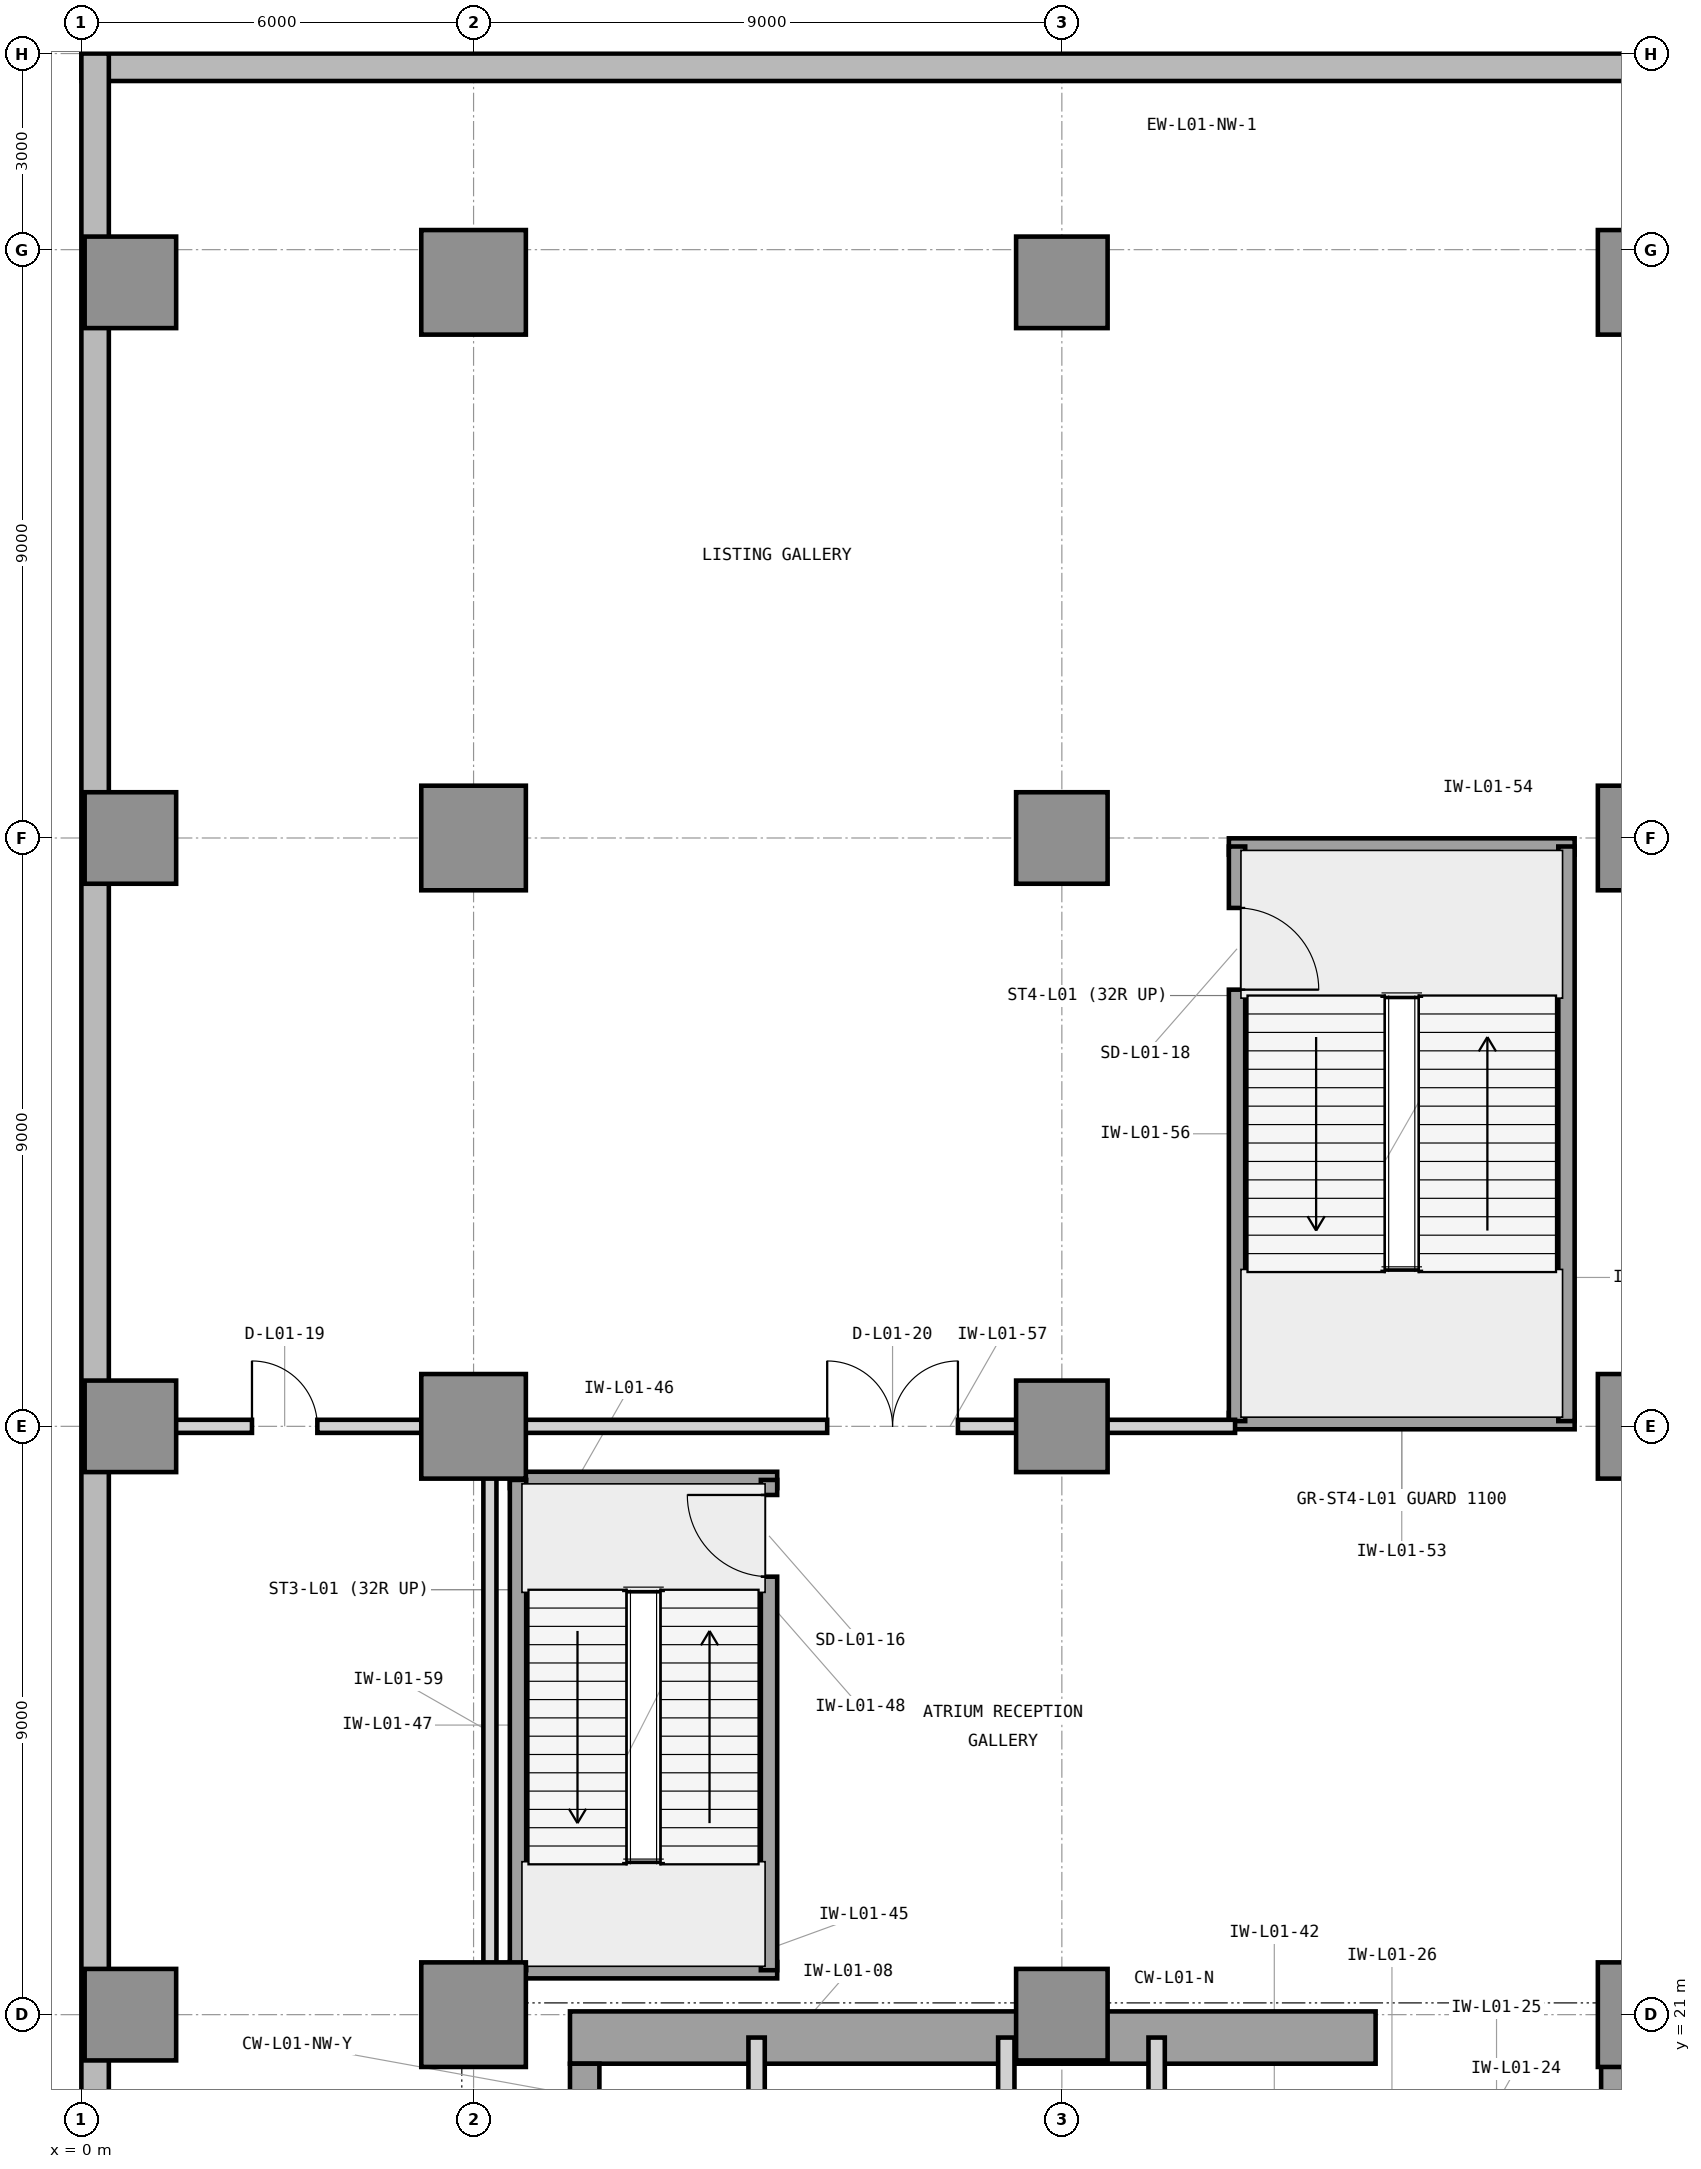
"""IFC4 building model, lengths in metres.
Left out: names, types, materials, properties, quantities, classifications, styles, units other than length and angle.
Written with IfcOpenShell. Run it as: python <this file> out.ifc"""

import sys

from ifc_helpers import new_model, si_unit, direction, frame, frame_2d, origin, origin_2d, place, context, subcontext, project, spatial, rectangle, extrude, element, fill, save


model = new_model("IFC4")
c1 = context("Model", 3, precision=1e-05, world=origin(), true_north=direction((0.0, 1.0)))
c2 = subcontext(c1, "Body", "Model", "MODEL_VIEW")
j1 = project(units=[si_unit("LENGTHUNIT", "METRE"), si_unit("PLANEANGLEUNIT", "RADIAN")], contexts=[c1])
p1 = place(None, origin())
s1 = spatial("IfcSite", under=j1, at=p1, CompositionType="ELEMENT")
p2 = place(p1, origin())
s2 = spatial("IfcBuilding", under=s1, at=p2, CompositionType="ELEMENT")
p3 = place(p2, frame((0.0, 0.0, 5.4)))
s3 = spatial("IfcBuildingStorey", under=s2, at=p3, CompositionType="ELEMENT", Elevation=5.4)
p4 = place(p3, frame((7.475, 20.65, 0.0), z_axis=(0.0, 0.0, 1.0), x_axis=(1.0, 0.0, 0.0)))
e1 = element("IfcWall", 1, at=p4, inside=s3, PredefinedType="SHEAR", context=c2, shape_type="SweptSolid", body=[
    extrude(rectangle(XDim=12.325, YDim=0.8, at=frame_2d((6.163, 0.0))), origin(), (0.0, 0.0, 1.0), 5.4),
])
p5 = place(p3, frame((23.65, 16.6, 0.0), z_axis=(0.0, 0.0, 1.0), x_axis=(0.0, 1.0, 0.0)))
e2 = element("IfcWall", 2, at=p5, inside=s3, PredefinedType="SHEAR", context=c2, shape_type="SweptSolid", body=[
    extrude(rectangle(XDim=4.05, YDim=0.8, at=frame_2d((2.025, 0.0))), origin(), (0.0, 0.0, 1.0), 5.4),
])
p6 = place(p3, frame((7.7, 19.575, 0.0), z_axis=(0.0, 0.0, 1.0), x_axis=(0.0, 1.0, 0.0)))
e3 = element("IfcWall", 3, at=p6, inside=s3, PredefinedType="SHEAR", context=c2, shape_type="SweptSolid", body=[
    extrude(rectangle(XDim=0.675, YDim=0.45, at=frame_2d((0.337, 0.0))), origin(), (0.0, 0.0, 1.0), 5.4),
])
for number, where, z_axis, x_axis in (
    (4, (0.75, 21.0, 0.0), (0.0, 0.0, 1.0), (1.0, 0.0, 0.0)),
    (5, (0.75, 30.0, 0.0), (0.0, 0.0, 1.0), (1.0, 0.0, 0.0)),
    (6, (0.75, 39.0, 0.0), (0.0, 0.0, 1.0), (1.0, 0.0, 0.0)),
    (7, (0.75, 47.5, 0.0), (0.0, 0.0, 1.0), (1.0, 0.0, 0.0)),
):
    element("IfcColumn", number, at=place(p3, frame(where, z_axis=z_axis, x_axis=x_axis)), inside=s3, PredefinedType="COLUMN", context=c2, shape_type="SweptSolid", body=[
        extrude(rectangle(XDim=1.4, YDim=1.4, at=origin_2d()), origin(), (0.0, 0.0, 1.0), 5.4),
    ])
for number, where, z_axis, x_axis in (
    (8, (6.0, 21.0, 0.0), (0.0, 0.0, 1.0), (1.0, 0.0, 0.0)),
    (9, (6.0, 30.0, 0.0), (0.0, 0.0, 1.0), (1.0, 0.0, 0.0)),
    (10, (6.0, 39.0, 0.0), (0.0, 0.0, 1.0), (1.0, 0.0, 0.0)),
    (11, (6.0, 47.5, 0.0), (0.0, 0.0, 1.0), (1.0, 0.0, 0.0)),
):
    element("IfcColumn", number, at=place(p3, frame(where, z_axis=z_axis, x_axis=x_axis)), inside=s3, PredefinedType="COLUMN", context=c2, shape_type="SweptSolid", body=[
        extrude(rectangle(XDim=1.6, YDim=1.6, at=origin_2d()), origin(), (0.0, 0.0, 1.0), 5.4),
    ])
for number, where, z_axis, x_axis in (
    (12, (15.0, 21.0, 0.0), (0.0, 0.0, 1.0), (1.0, 0.0, 0.0)),
    (13, (15.0, 30.0, 0.0), (0.0, 0.0, 1.0), (1.0, 0.0, 0.0)),
    (14, (15.0, 39.0, 0.0), (0.0, 0.0, 1.0), (1.0, 0.0, 0.0)),
    (15, (15.0, 47.5, 0.0), (0.0, 0.0, 1.0), (1.0, 0.0, 0.0)),
):
    element("IfcColumn", number, at=place(p3, frame(where, z_axis=z_axis, x_axis=x_axis)), inside=s3, PredefinedType="COLUMN", context=c2, shape_type="SweptSolid", body=[
        extrude(rectangle(XDim=1.4, YDim=1.4, at=origin_2d()), origin(), (0.0, 0.0, 1.0), 5.4),
    ])
for number, where, z_axis, x_axis in (
    (16, (24.0, 21.0, 0.0), (0.0, 0.0, 1.0), (1.0, 0.0, 0.0)),
    (17, (24.0, 30.0, 0.0), (0.0, 0.0, 1.0), (1.0, 0.0, 0.0)),
    (18, (24.0, 39.0, 0.0), (0.0, 0.0, 1.0), (1.0, 0.0, 0.0)),
    (19, (24.0, 47.5, 0.0), (0.0, 0.0, 1.0), (1.0, 0.0, 0.0)),
):
    element("IfcColumn", number, at=place(p3, frame(where, z_axis=z_axis, x_axis=x_axis)), inside=s3, PredefinedType="COLUMN", context=c2, shape_type="SweptSolid", body=[
        extrude(rectangle(XDim=1.6, YDim=1.6, at=origin_2d()), origin(), (0.0, 0.0, 1.0), 5.4),
    ])
p7 = place(p3, frame((34.28, 50.79, 0.0), z_axis=(0.0, 0.0, 1.0), x_axis=(-1.0, 0.0, 0.0)))
e20 = element("IfcWall", 20, at=p7, inside=s3, PredefinedType="STANDARD", context=c2, shape_type="SweptSolid", body=[
    extrude(rectangle(XDim=34.28, YDim=0.42, at=frame_2d((17.14, 0.0))), origin(), (0.0, 0.0, 1.0), 5.1),
])
p8 = place(p7, frame((5.746, 0.0, 0.9)))
e21 = element("IfcOpeningElement", 21, at=p8, cuts=e20, PredefinedType="OPENING", context=c2, shape_type="SweptSolid", body=[
    extrude(rectangle(XDim=3.2, YDim=3.1, at=frame_2d((1.6, 1.55))), frame((0.0, 0.22, 0.0), z_axis=(0.0, -1.0, 0.0), x_axis=(1.0, 0.0, 0.0)), (0.0, 0.0, 1.0), 0.44),
])
p9 = place(p3, frame((0.21, 51.0, 0.0), z_axis=(0.0, 0.0, 1.0), x_axis=(0.0, -1.0, 0.0)))
e22 = element("IfcWall", 22, at=p9, inside=s3, PredefinedType="STANDARD", context=c2, shape_type="SweptSolid", body=[
    extrude(rectangle(XDim=51.0, YDim=0.42, at=frame_2d((25.5, 0.0))), origin(), (0.0, 0.0, 1.0), 5.1),
])
p10 = place(p9, frame((33.173, 0.0, 0.9)))
e23 = element("IfcOpeningElement", 23, at=p10, cuts=e22, PredefinedType="OPENING", context=c2, shape_type="SweptSolid", body=[
    extrude(rectangle(XDim=3.2, YDim=3.1, at=frame_2d((1.6, 1.55))), frame((0.0, 0.22, 0.0), z_axis=(0.0, -1.0, 0.0), x_axis=(1.0, 0.0, 0.0)), (0.0, 0.0, 1.0), 0.44),
])
p11 = place(p3, frame((10.33, 19.45, 0.0), z_axis=(0.0, 0.0, 1.0), x_axis=(0.0, 1.0, 0.0)))
e24 = element("IfcWall", 24, at=p11, inside=s3, PredefinedType="PARTITIONING", context=c2, shape_type="SweptSolid", body=[
    extrude(rectangle(XDim=1.2, YDim=0.25, at=frame_2d((0.6, 0.0))), origin(), (0.0, 0.0, 1.0), 4.234),
])
for number, where, z_axis, x_axis in (
    (25, (14.15, 16.7, 0.0), (0.0, 0.0, 1.0), (0.0, 1.0, 0.0)),
    (26, (16.45, 16.7, 0.0), (0.0, 0.0, 1.0), (0.0, 1.0, 0.0)),
):
    element("IfcWall", number, at=place(p3, frame(where, z_axis=z_axis, x_axis=x_axis)), inside=s3, PredefinedType="PARTITIONING", context=c2, shape_type="SweptSolid", body=[
        extrude(rectangle(XDim=3.95, YDim=0.25, at=frame_2d((1.975, 0.0))), origin(), (0.0, 0.0, 1.0), 5.09),
    ])
for number, where, z_axis, x_axis in (
    (27, (6.555, 21.68, 0.0), (0.0, 0.0, 1.0), (1.0, 0.0, 0.0)),
    (28, (6.555, 29.18, 0.0), (0.0, 0.0, 1.0), (1.0, 0.0, 0.0)),
):
    element("IfcWall", number, at=place(p3, frame(where, z_axis=z_axis, x_axis=x_axis)), inside=s3, PredefinedType="SHEAR", context=c2, shape_type="SweptSolid", body=[
        extrude(rectangle(XDim=4.09, YDim=0.25, at=frame_2d((2.045, 0.0))), origin(), (0.0, 0.0, 1.0), 5.4),
    ])
p12 = place(p3, frame((6.68, 21.68, 0.0), z_axis=(0.0, 0.0, 1.0), x_axis=(0.0, 1.0, 0.0)))
e29 = element("IfcWall", 29, at=p12, inside=s3, PredefinedType="SHEAR", context=c2, shape_type="SweptSolid", body=[
    extrude(rectangle(XDim=7.5, YDim=0.25, at=frame_2d((3.75, 0.0))), origin(), (0.0, 0.0, 1.0), 5.4),
])
p13 = place(p3, frame((10.52, 21.68, 0.0), z_axis=(0.0, 0.0, 1.0), x_axis=(0.0, 1.0, 0.0)))
e30 = element("IfcWall", 30, at=p13, inside=s3, PredefinedType="SHEAR", context=c2, shape_type="SweptSolid", body=[
    extrude(rectangle(XDim=7.5, YDim=0.25, at=frame_2d((3.75, 0.0))), origin(), (0.0, 0.0, 1.0), 5.4),
])
p14 = place(p13, frame((6.02, 0.0, 0.0)))
e31 = element("IfcOpeningElement", 31, at=p14, cuts=e30, PredefinedType="OPENING", context=c2, shape_type="SweptSolid", body=[
    extrude(rectangle(XDim=1.25, YDim=2.2, at=frame_2d((0.625, 1.1))), frame((0.0, 0.135, 0.0), z_axis=(0.0, -1.0, 0.0), x_axis=(1.0, 0.0, 0.0)), (0.0, 0.0, 1.0), 0.27),
])
for number, where, z_axis, x_axis in (
    (32, (17.555, 30.08, 0.0), (0.0, 0.0, 1.0), (1.0, 0.0, 0.0)),
    (33, (17.555, 38.87, 0.0), (0.0, 0.0, 1.0), (1.0, 0.0, 0.0)),
):
    element("IfcWall", number, at=place(p3, frame(where, z_axis=z_axis, x_axis=x_axis)), inside=s3, PredefinedType="SHEAR", context=c2, shape_type="SweptSolid", body=[
        extrude(rectangle(XDim=5.29, YDim=0.25, at=frame_2d((2.645, 0.0))), origin(), (0.0, 0.0, 1.0), 5.4),
    ])
p15 = place(p3, frame((22.72, 30.08, 0.0), z_axis=(0.0, 0.0, 1.0), x_axis=(0.0, 1.0, 0.0)))
e34 = element("IfcWall", 34, at=p15, inside=s3, PredefinedType="SHEAR", context=c2, shape_type="SweptSolid", body=[
    extrude(rectangle(XDim=8.79, YDim=0.25, at=frame_2d((4.395, 0.0))), origin(), (0.0, 0.0, 1.0), 5.4),
])
p16 = place(p3, frame((17.68, 30.08, 0.0), z_axis=(0.0, 0.0, 1.0), x_axis=(0.0, 1.0, 0.0)))
e35 = element("IfcWall", 35, at=p16, inside=s3, PredefinedType="SHEAR", context=c2, shape_type="SweptSolid", body=[
    extrude(rectangle(XDim=8.79, YDim=0.25, at=frame_2d((4.395, 0.0))), origin(), (0.0, 0.0, 1.0), 5.4),
])
p17 = place(p16, frame((6.6, 0.0, 0.0)))
e36 = element("IfcOpeningElement", 36, at=p17, cuts=e35, PredefinedType="OPENING", context=c2, shape_type="SweptSolid", body=[
    extrude(rectangle(XDim=1.25, YDim=2.2, at=frame_2d((0.625, 1.1))), frame((0.0, 0.135, 0.0), z_axis=(0.0, -1.0, 0.0), x_axis=(1.0, 0.0, 0.0)), (0.0, 0.0, 1.0), 0.27),
])
p18 = place(p3, frame((0.21, 30.0, 0.0), z_axis=(0.0, 0.0, 1.0), x_axis=(1.0, 0.0, 0.0)))
e37 = element("IfcWall", 37, at=p18, inside=s3, PredefinedType="PARTITIONING", context=c2, shape_type="SweptSolid", body=[
    extrude(rectangle(XDim=17.44, YDim=0.2, at=frame_2d((8.72, 0.0))), origin(), (0.0, 0.0, 1.0), 4.234),
])
p19 = place(p18, frame((2.4, 0.0, 0.0)))
e38 = element("IfcOpeningElement", 38, at=p19, cuts=e37, PredefinedType="OPENING", context=c2, shape_type="SweptSolid", body=[
    extrude(rectangle(XDim=1.0, YDim=2.15, at=frame_2d((0.5, 1.075))), frame((0.0, 0.11, 0.0), z_axis=(0.0, -1.0, 0.0), x_axis=(1.0, 0.0, 0.0)), (0.0, 0.0, 1.0), 0.22),
])
p20 = place(p18, frame((11.2, 0.0, 0.0)))
e39 = element("IfcOpeningElement", 39, at=p20, cuts=e37, PredefinedType="OPENING", context=c2, shape_type="SweptSolid", body=[
    extrude(rectangle(XDim=2.0, YDim=2.5, at=frame_2d((1.0, 1.25))), frame((0.0, 0.11, 0.0), z_axis=(0.0, -1.0, 0.0), x_axis=(1.0, 0.0, 0.0)), (0.0, 0.0, 1.0), 0.22),
])
p21 = place(p3, frame((6.25, 20.65, 0.0), z_axis=(0.0, 0.0, 1.0), x_axis=(0.0, 1.0, 0.0)))
e40 = element("IfcWall", 40, at=p21, inside=s3, PredefinedType="PARTITIONING", context=c2, shape_type="SweptSolid", body=[
    extrude(rectangle(XDim=9.35, YDim=0.2, at=frame_2d((4.675, 0.0))), origin(), (0.0, 0.0, 1.0), 5.09),
])
p22 = place(p14, origin())
e41 = element("IfcDoor", 41, at=p22, inside=s3, OperationType="SINGLE_SWING_RIGHT", PredefinedType="DOOR", context=c2, shape_type="SweptSolid", body=[
    extrude(rectangle(XDim=1.25, YDim=2.2, at=frame_2d((0.625, 1.1))), frame((0.0, 0.025, 0.0), z_axis=(0.0, -1.0, 0.0), x_axis=(1.0, 0.0, 0.0)), (0.0, 0.0, 1.0), 0.05),
])
fill(e31, e41)
p23 = place(p17, frame((1.25, 0.0, 0.0), z_axis=(0.0, 0.0, 1.0), x_axis=(-1.0, 0.0, 0.0)))
e42 = element("IfcDoor", 42, at=p23, inside=s3, OperationType="SINGLE_SWING_RIGHT", PredefinedType="DOOR", context=c2, shape_type="SweptSolid", body=[
    extrude(rectangle(XDim=1.25, YDim=2.2, at=frame_2d((0.625, 1.1))), frame((0.0, 0.025, 0.0), z_axis=(0.0, -1.0, 0.0), x_axis=(1.0, 0.0, 0.0)), (0.0, 0.0, 1.0), 0.05),
])
fill(e36, e42)
p24 = place(p19, origin())
e43 = element("IfcDoor", 43, at=p24, inside=s3, OperationType="SINGLE_SWING_LEFT", PredefinedType="DOOR", context=c2, shape_type="SweptSolid", body=[
    extrude(rectangle(XDim=1.0, YDim=2.15, at=frame_2d((0.5, 1.075))), frame((0.0, 0.025, 0.0), z_axis=(0.0, -1.0, 0.0), x_axis=(1.0, 0.0, 0.0)), (0.0, 0.0, 1.0), 0.05),
])
fill(e38, e43)
p25 = place(p20, origin())
e44 = element("IfcDoor", 44, at=p25, inside=s3, OperationType="DOUBLE_DOOR_SINGLE_SWING", PredefinedType="DOOR", context=c2, shape_type="SweptSolid", body=[
    extrude(rectangle(XDim=2.0, YDim=2.5, at=frame_2d((1.0, 1.25))), frame((0.0, 0.025, 0.0), z_axis=(0.0, -1.0, 0.0), x_axis=(1.0, 0.0, 0.0)), (0.0, 0.0, 1.0), 0.05),
])
fill(e39, e44)
save(model, sys.argv[1])
